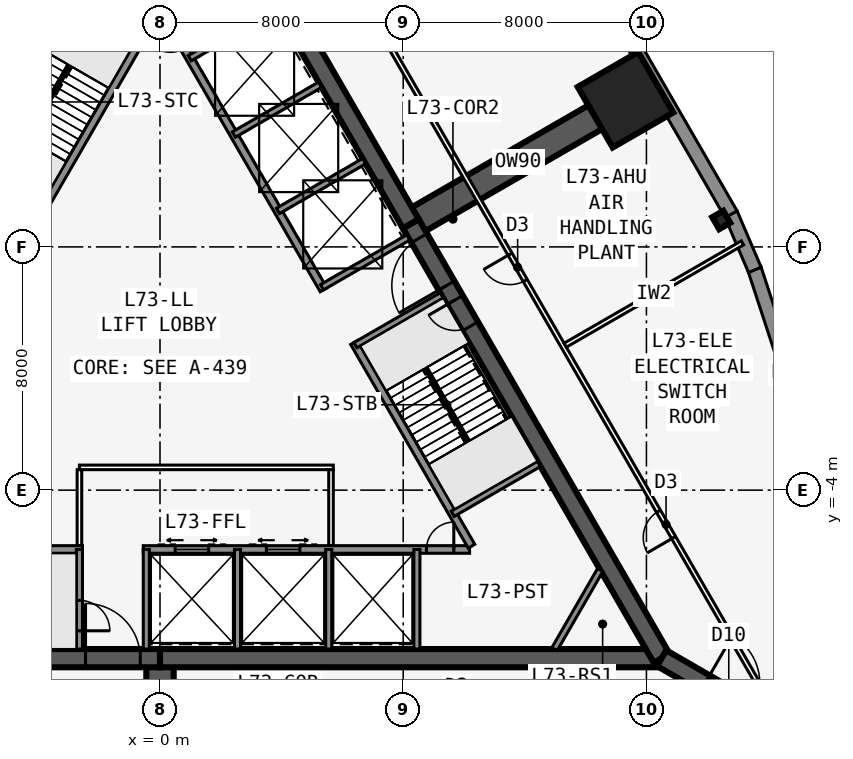
"""IFC4 building model, lengths in metres.
Left out: names, types, materials, properties, quantities, classifications, styles, units other than length and angle.
Written with IfcOpenShell. Run it as: python <this file> out.ifc"""

import sys

from ifc_helpers import new_model, si_unit, direction, frame, frame_2d, origin, origin_2d, place, context, subcontext, project, spatial, polyline, rectangle, i_section, outline, extrude, element, fill, save


model = new_model("IFC4")
c1 = context("Model", 3, precision=1e-05, world=origin(), true_north=direction((0.0, 1.0)))
c2 = subcontext(c1, "Body", "Model", "MODEL_VIEW")
j1 = project(units=[si_unit("LENGTHUNIT", "METRE"), si_unit("PLANEANGLEUNIT", "RADIAN")], contexts=[c1])
p1 = place(None, origin())
s1 = spatial("IfcSite", under=j1, at=p1, CompositionType="ELEMENT")
p2 = place(p1, origin())
s2 = spatial("IfcBuilding", under=s1, at=p2, CompositionType="ELEMENT")
p3 = place(p2, frame((0.0, 0.0, 275.3)))
s3 = spatial("IfcBuildingStorey", under=s2, at=p3, CompositionType="ELEMENT", Elevation=275.3)
p4 = place(p3, frame((-16.5, -9.526, 0.0), z_axis=(0.0, 0.0, 1.0), x_axis=(1.0, 0.0, 0.0)))
e1 = element("IfcWall", 1, at=p4, inside=s3, PredefinedType="SHEAR", context=c2, shape_type="SweptSolid", body=[
    extrude(rectangle(XDim=16.5, YDim=0.6, at=frame_2d((8.25, 0.0))), origin(), (0.0, 0.0, 1.0), 6.0),
])
p5 = place(p4, frame((14.05, 0.0, 0.0)))
e2 = element("IfcOpeningElement", 2, at=p5, cuts=e1, PredefinedType="OPENING", context=c2, shape_type="SweptSolid", body=[
    extrude(rectangle(XDim=1.8, YDim=2.13, at=frame_2d((0.9, 1.065))), frame((0.0, 0.31, 0.0), z_axis=(0.0, -1.0, 0.0), x_axis=(1.0, 0.0, 0.0)), (0.0, 0.0, 1.0), 0.62),
])
p6 = place(p3, frame((0.0, -9.526, 0.0), z_axis=(0.0, 0.0, 1.0), x_axis=(1.0, 0.0, 0.0)))
e3 = element("IfcWall", 3, at=p6, inside=s3, PredefinedType="SHEAR", context=c2, shape_type="SweptSolid", body=[
    extrude(rectangle(XDim=16.5, YDim=0.6, at=frame_2d((8.25, 0.0))), origin(), (0.0, 0.0, 1.0), 6.0),
])
p7 = place(p3, frame((-10.183, -5.951, 0.0), z_axis=(0.0, 0.0, 1.0), x_axis=(1.0, 0.0, 0.0)))
e4 = element("IfcWall", 4, at=p7, inside=s3, PredefinedType="SOLIDWALL", context=c2, shape_type="SweptSolid", body=[
    extrude(rectangle(XDim=7.633, YDim=0.25, at=frame_2d((3.816, 0.0))), origin(), (0.0, 0.0, 1.0), 5.75),
])
p8 = place(p3, frame((-0.55, -5.951, 0.0), z_axis=(0.0, 0.0, 1.0), x_axis=(1.0, 0.0, 0.0)))
e5 = element("IfcWall", 5, at=p8, inside=s3, PredefinedType="SOLIDWALL", context=c2, shape_type="SweptSolid", body=[
    extrude(rectangle(XDim=10.733, YDim=0.25, at=frame_2d((5.366, 0.0))), origin(), (0.0, 0.0, 1.0), 5.75),
])
p9 = place(p8, frame((9.314, 0.0, 0.0)))
e6 = element("IfcOpeningElement", 6, at=p9, cuts=e5, PredefinedType="OPENING", context=c2, shape_type="SweptSolid", body=[
    extrude(rectangle(XDim=0.9, YDim=2.13, at=frame_2d((0.45, 1.065))), frame((0.0, 0.135, 0.0), z_axis=(0.0, -1.0, 0.0), x_axis=(1.0, 0.0, 0.0)), (0.0, 0.0, 1.0), 0.27),
])
p10 = place(p8, frame((1.05, 0.0, 0.0)))
e7 = element("IfcOpeningElement", 7, at=p10, cuts=e5, PredefinedType="OPENING", context=c2, shape_type="SweptSolid", body=[
    extrude(rectangle(XDim=1.1, YDim=2.13, at=frame_2d((0.55, 1.065))), frame((0.0, 0.135, 0.0), z_axis=(0.0, -1.0, 0.0), x_axis=(1.0, 0.0, 0.0)), (0.0, 0.0, 1.0), 0.27),
])
p11 = place(p8, frame((4.05, 0.0, 0.0)))
e8 = element("IfcOpeningElement", 8, at=p11, cuts=e5, PredefinedType="OPENING", context=c2, shape_type="SweptSolid", body=[
    extrude(rectangle(XDim=1.1, YDim=2.13, at=frame_2d((0.55, 1.065))), frame((0.0, 0.135, 0.0), z_axis=(0.0, -1.0, 0.0), x_axis=(1.0, 0.0, 0.0)), (0.0, 0.0, 1.0), 0.27),
])
p12 = place(p3, frame((-2.65, -5.951, 0.0), z_axis=(0.0, 0.0, 1.0), x_axis=(0.0, -1.0, 0.0)))
e9 = element("IfcWall", 9, at=p12, inside=s3, PredefinedType="SOLIDWALL", context=c2, shape_type="SweptSolid", body=[
    extrude(rectangle(XDim=3.275, YDim=0.2, at=frame_2d((1.637, 0.0))), origin(), (0.0, 0.0, 1.0), 5.75),
])
p13 = place(p12, frame((1.675, 0.0, 0.0)))
e10 = element("IfcOpeningElement", 10, at=p13, cuts=e9, PredefinedType="OPENING", context=c2, shape_type="SweptSolid", body=[
    extrude(rectangle(XDim=1.0, YDim=2.13, at=frame_2d((0.5, 1.065))), frame((0.0, 0.11, 0.0), z_axis=(0.0, -1.0, 0.0), x_axis=(1.0, 0.0, 0.0)), (0.0, 0.0, 1.0), 0.22),
])
for number, where, z_axis, x_axis in (
    (11, (-0.45, -5.951, 0.0), (0.0, 0.0, 1.0), (0.0, -1.0, 0.0)),
    (12, (2.55, -5.951, 0.0), (0.0, 0.0, 1.0), (0.0, -1.0, 0.0)),
    (13, (5.55, -5.951, 0.0), (0.0, 0.0, 1.0), (0.0, -1.0, 0.0)),
    (14, (8.45, -5.951, 0.0), (0.0, 0.0, 1.0), (0.0, -1.0, 0.0)),
):
    element("IfcWall", number, at=place(p3, frame(where, z_axis=z_axis, x_axis=x_axis)), inside=s3, PredefinedType="SOLIDWALL", context=c2, shape_type="SweptSolid", body=[
        extrude(rectangle(XDim=3.275, YDim=0.2, at=frame_2d((1.637, 0.0))), origin(), (0.0, 0.0, 1.0), 5.75),
    ])
p14 = place(p3, frame((16.5, -9.526, 0.0), z_axis=(0.0, 0.0, 1.0), x_axis=(-0.499996545922, 0.866027397988, 0.0)))
e15 = element("IfcWall", 15, at=p14, inside=s3, PredefinedType="SHEAR", context=c2, shape_type="SweptSolid", body=[
    extrude(rectangle(XDim=16.5, YDim=0.6, at=frame_2d((8.25, 0.0))), origin(), (0.0, 0.0, 1.0), 6.0),
])
p15 = place(p14, frame((14.15, 0.0, 0.0)))
e16 = element("IfcOpeningElement", 16, at=p15, cuts=e15, PredefinedType="OPENING", context=c2, shape_type="SweptSolid", body=[
    extrude(rectangle(XDim=1.8, YDim=2.13, at=frame_2d((0.9, 1.065))), frame((0.0, 0.31, 0.0), z_axis=(0.0, -1.0, 0.0), x_axis=(1.0, 0.0, 0.0)), (0.0, 0.0, 1.0), 0.62),
])
p16 = place(p14, frame((12.6, 0.0, 0.0)))
e17 = element("IfcOpeningElement", 17, at=p16, cuts=e15, PredefinedType="OPENING", context=c2, shape_type="SweptSolid", body=[
    extrude(rectangle(XDim=1.0, YDim=2.13, at=frame_2d((0.5, 1.065))), frame((0.0, 0.31, 0.0), z_axis=(0.0, -1.0, 0.0), x_axis=(1.0, 0.0, 0.0)), (0.0, 0.0, 1.0), 0.62),
])
p17 = place(p3, frame((8.25, 4.763, 0.0), z_axis=(0.0, 0.0, 1.0), x_axis=(-0.500002952946, 0.866023698893, 0.0)))
e18 = element("IfcWall", 18, at=p17, inside=s3, PredefinedType="SHEAR", context=c2, shape_type="SweptSolid", body=[
    extrude(rectangle(XDim=16.5, YDim=0.6, at=frame_2d((8.25, 0.0))), origin(), (0.0, 0.0, 1.0), 6.0),
])
p18 = place(p3, frame((10.245, -5.843, 0.0), z_axis=(0.0, 0.0, 1.0), x_axis=(-0.499993009313, 0.866029439822, 0.0)))
e19 = element("IfcWall", 19, at=p18, inside=s3, PredefinedType="SOLIDWALL", context=c2, shape_type="SweptSolid", body=[
    extrude(rectangle(XDim=7.733, YDim=0.25, at=frame_2d((3.866, 0.0))), origin(), (0.0, 0.0, 1.0), 5.75),
])
p19 = place(p3, frame((5.379, 2.586, 0.0), z_axis=(0.0, 0.0, 1.0), x_axis=(-0.500001375892, 0.866024609411, 0.0)))
e20 = element("IfcWall", 20, at=p19, inside=s3, PredefinedType="SOLIDWALL", context=c2, shape_type="SweptSolid", body=[
    extrude(rectangle(XDim=10.633, YDim=0.25, at=frame_2d((5.316, 0.0))), origin(), (0.0, 0.0, 1.0), 5.75),
])
p20 = place(p19, frame((9.164, 0.0, 0.0)))
e21 = element("IfcOpeningElement", 21, at=p20, cuts=e20, PredefinedType="OPENING", context=c2, shape_type="SweptSolid", body=[
    extrude(rectangle(XDim=0.9, YDim=2.13, at=frame_2d((0.45, 1.065))), frame((0.0, 0.135, 0.0), z_axis=(0.0, -1.0, 0.0), x_axis=(1.0, 0.0, 0.0)), (0.0, 0.0, 1.0), 0.27),
])
p21 = place(p3, frame((9.629, -4.775, 0.0), z_axis=(0.0, 0.0, 1.0), x_axis=(0.865995643347, 0.500051543047, 0.0)))
e22 = element("IfcWall", 22, at=p21, inside=s3, PredefinedType="SOLIDWALL", context=c2, shape_type="SweptSolid", body=[
    extrude(rectangle(XDim=3.275, YDim=0.2, at=frame_2d((1.638, 0.0))), origin(), (0.0, 0.0, 1.0), 5.75),
])
for number, where, z_axis, x_axis in (
    (23, (6.429, 0.767, 0.0), (0.0, 0.0, 1.0), (0.866, 0.5, 0.0)),
    (24, (5.329, 2.673, 0.0), (0.0, 0.0, 1.0), (0.866, 0.5, 0.0)),
    (25, (3.879, 5.184, 0.0), (0.0, 0.0, 1.0), (0.866, 0.5, 0.0)),
    (26, (2.429, 7.696, 0.0), (0.0, 0.0, 1.0), (0.866, 0.5, 0.0)),
    (27, (0.979, 10.207, 0.0), (0.0, 0.0, 1.0), (0.866, 0.5, 0.0)),
):
    element("IfcWall", number, at=place(p3, frame(where, z_axis=z_axis, x_axis=x_axis)), inside=s3, PredefinedType="SOLIDWALL", context=c2, shape_type="SweptSolid", body=[
        extrude(rectangle(XDim=3.275, YDim=0.2, at=frame_2d((1.637, 0.0))), origin(), (0.0, 0.0, 1.0), 5.75),
    ])
p22 = place(p3, frame((0.0, 19.052, 0.0), z_axis=(0.0, 0.0, 1.0), x_axis=(-0.500002952946, -0.866023698893, 0.0)))
e28 = element("IfcWall", 28, at=p22, inside=s3, PredefinedType="SHEAR", context=c2, shape_type="SweptSolid", body=[
    extrude(rectangle(XDim=16.5, YDim=0.6, at=frame_2d((8.25, 0.0))), origin(), (0.0, 0.0, 1.0), 6.0),
])
p23 = place(p22, frame((14.15, 0.0, 0.0)))
e29 = element("IfcOpeningElement", 29, at=p23, cuts=e28, PredefinedType="OPENING", context=c2, shape_type="SweptSolid", body=[
    extrude(rectangle(XDim=1.8, YDim=2.13, at=frame_2d((0.9, 1.065))), frame((0.0, 0.31, 0.0), z_axis=(0.0, -1.0, 0.0), x_axis=(1.0, 0.0, 0.0)), (0.0, 0.0, 1.0), 0.62),
])
p24 = place(p22, frame((12.6, 0.0, 0.0)))
e30 = element("IfcOpeningElement", 30, at=p24, cuts=e28, PredefinedType="OPENING", context=c2, shape_type="SweptSolid", body=[
    extrude(rectangle(XDim=1.0, YDim=2.13, at=frame_2d((0.5, 1.065))), frame((0.0, 0.31, 0.0), z_axis=(0.0, -1.0, 0.0), x_axis=(1.0, 0.0, 0.0)), (0.0, 0.0, 1.0), 0.62),
])
p25 = place(p3, frame((-0.062, 11.794, 0.0), z_axis=(0.0, 0.0, 1.0), x_axis=(-0.500006680225, -0.86602154692, 0.0)))
e31 = element("IfcWall", 31, at=p25, inside=s3, PredefinedType="SOLIDWALL", context=c2, shape_type="SweptSolid", body=[
    extrude(rectangle(XDim=7.733, YDim=0.25, at=frame_2d((3.866, 0.0))), origin(), (0.0, 0.0, 1.0), 5.75),
])
p26 = place(p3, frame((16.5, -9.526, 0.0), z_axis=(0.0, 0.0, 1.0), x_axis=(0.866031398331, -0.499989616998, 0.0)))
e32 = element("IfcWall", 32, at=p26, inside=s3, PredefinedType="SHEAR", context=c2, shape_type="SweptSolid", body=[
    extrude(rectangle(XDim=4.746, YDim=0.6, at=frame_2d((2.373, 0.0))), origin(), (0.0, 0.0, 1.0), 6.0),
])
p27 = place(p26, frame((1.65, 0.0, 0.0)))
e33 = element("IfcOpeningElement", 33, at=p27, cuts=e32, PredefinedType="OPENING", context=c2, shape_type="SweptSolid", body=[
    extrude(rectangle(XDim=1.8, YDim=2.13, at=frame_2d((0.9, 1.065))), frame((0.0, 0.31, 0.0), z_axis=(0.0, -1.0, 0.0), x_axis=(1.0, 0.0, 0.0)), (0.0, 0.0, 1.0), 0.62),
])
p28 = place(p3, frame((0.0, -9.526, 0.0), z_axis=(0.0, 0.0, 1.0), x_axis=(0.0, -1.0, 0.0)))
e34 = element("IfcWall", 34, at=p28, inside=s3, PredefinedType="SHEAR", context=c2, shape_type="SweptSolid", body=[
    extrude(rectangle(XDim=8.154, YDim=0.9, at=frame_2d((4.077, 0.0))), origin(), (0.0, 0.0, 1.0), 6.0),
])
p29 = place(p3, frame((8.25, 4.763, 0.0), z_axis=(0.0, 0.0, 1.0), x_axis=(0.866023543838, 0.500003221507, 0.0)))
e35 = element("IfcWall", 35, at=p29, inside=s3, PredefinedType="SHEAR", context=c2, shape_type="SweptSolid", body=[
    extrude(rectangle(XDim=8.154, YDim=0.9, at=frame_2d((4.077, 0.0))), origin(), (0.0, 0.0, 1.0), 6.0),
])
p30 = place(p3, frame((18.461, 4.885, 0.0), z_axis=(0.0, 0.0, 1.0), x_axis=(0.866025403784, 0.5, 0.0)))
e36 = element("IfcColumn", 36, at=p30, inside=s3, PredefinedType="COLUMN", context=c2, shape_type="SweptSolid", body=[
    extrude(i_section(OverallWidth=0.419, OverallDepth=0.455, WebThickness=0.042, FlangeThickness=0.068, at=origin_2d()), origin(), (0.0, 0.0, 1.0), 6.0),
])
p31 = place(p3, frame((15.312, 8.84, 0.0), z_axis=(0.0, 0.0, 1.0), x_axis=(0.866025403784, 0.5, 0.0)))
e37 = element("IfcColumn", 37, at=p31, inside=s3, PredefinedType="COLUMN", context=c2, shape_type="SweptSolid", body=[
    extrude(rectangle(XDim=2.3, YDim=2.3, at=origin_2d()), origin(), (0.0, 0.0, 1.0), 6.0),
])
p32 = place(p3, frame((21.786, -3.534, 0.0), z_axis=(0.0, 0.0, 1.0), x_axis=(-0.311328857048, 0.95030223759, 0.0)))
e38 = element("IfcWall", 38, at=p32, inside=s3, PredefinedType="SOLIDWALL", context=c2, shape_type="SweptSolid", body=[
    extrude(outline(polyline([(0.0, 0.0), (7.153, 0.0), (7.153, 5.75), (0.0, 5.75), (0.0, 0.0)]), holes=[polyline([(5.826, 2.875), (5.75, 3.457), (5.525, 4.0), (5.167, 4.466), (4.701, 4.823), (4.159, 5.048), (3.576, 5.125), (2.994, 5.048), (2.451, 4.823), (1.985, 4.466), (1.628, 4.0), (1.403, 3.457), (1.326, 2.875), (1.403, 2.293), (1.628, 1.75), (1.985, 1.284), (2.451, 0.926), (2.994, 0.702), (3.576, 0.625), (4.159, 0.702), (4.701, 0.926), (5.167, 1.284), (5.525, 1.75), (5.75, 2.293), (5.826, 2.875)])]), frame((0.0, 0.225, 0.0), z_axis=(0.0, -1.0, 0.0), x_axis=(1.0, 0.0, 0.0)), (0.0, 0.0, 1.0), 0.45),
])
p33 = place(p3, frame((19.566, 3.245, 0.0), z_axis=(0.0, 0.0, 1.0), x_axis=(-0.393290226175, 0.91941437774, 0.0)))
e39 = element("IfcWall", 39, at=p33, inside=s3, PredefinedType="SOLIDWALL", context=c2, shape_type="SweptSolid", body=[
    extrude(rectangle(XDim=2.014, YDim=0.45, at=frame_2d((1.007, 0.0))), origin(), (0.0, 0.0, 1.0), 5.75),
])
p34 = place(p3, frame((18.786, 5.073, 0.0), z_axis=(0.0, 0.0, 1.0), x_axis=(-0.499993662806, 0.866029062534, 0.0)))
e40 = element("IfcWall", 40, at=p34, inside=s3, PredefinedType="SOLIDWALL", context=c2, shape_type="SweptSolid", body=[
    extrude(outline(polyline([(0.0, 0.0), (10.0, 0.0), (10.0, 5.75), (0.0, 5.75), (0.0, 0.0)]), holes=[polyline([(7.25, 2.875), (7.173, 3.457), (6.948, 4.0), (6.591, 4.466), (6.125, 4.823), (5.583, 5.048), (5.0, 5.125), (4.418, 5.048), (3.875, 4.823), (3.409, 4.466), (3.052, 4.0), (2.827, 3.457), (2.75, 2.875), (2.827, 2.293), (3.052, 1.75), (3.409, 1.284), (3.875, 0.926), (4.418, 0.702), (5.0, 0.625), (5.583, 0.702), (6.125, 0.926), (6.591, 1.284), (6.948, 1.75), (7.173, 2.293), (7.25, 2.875)])]), frame((0.0, 0.225, 0.0), z_axis=(0.0, -1.0, 0.0), x_axis=(1.0, 0.0, 0.0)), (0.0, 0.0, 1.0), 0.45),
])
p35 = place(p3, frame((20.177, -11.245, 0.0), z_axis=(0.0, 0.0, 1.0), x_axis=(-0.499998875317, 0.866026053119, 0.0)))
e41 = element("IfcWall", 41, at=p35, inside=s3, PredefinedType="PARTITIONING", context=c2, shape_type="SweptSolid", body=[
    extrude(rectangle(XDim=39.654, YDim=0.15, at=frame_2d((19.827, 0.0))), origin(), (0.0, 0.0, 1.0), 5.75),
])
p36 = place(p35, frame((6.563, 0.0, 0.0)))
e42 = element("IfcOpeningElement", 42, at=p36, cuts=e41, PredefinedType="OPENING", context=c2, shape_type="SweptSolid", body=[
    extrude(rectangle(XDim=1.0, YDim=2.13, at=frame_2d((0.5, 1.065))), frame((0.0, 0.085, 0.0), z_axis=(0.0, -1.0, 0.0), x_axis=(1.0, 0.0, 0.0)), (0.0, 0.0, 1.0), 0.17),
])
p37 = place(p35, frame((16.327, 0.0, 0.0)))
e43 = element("IfcOpeningElement", 43, at=p37, cuts=e41, PredefinedType="OPENING", context=c2, shape_type="SweptSolid", body=[
    extrude(rectangle(XDim=1.0, YDim=2.13, at=frame_2d((0.5, 1.065))), frame((0.0, 0.085, 0.0), z_axis=(0.0, -1.0, 0.0), x_axis=(1.0, 0.0, 0.0)), (0.0, 0.0, 1.0), 0.17),
])
p38 = place(p35, frame((29.091, 0.0, 0.0)))
e44 = element("IfcOpeningElement", 44, at=p38, cuts=e41, PredefinedType="OPENING", context=c2, shape_type="SweptSolid", body=[
    extrude(rectangle(XDim=1.0, YDim=2.13, at=frame_2d((0.5, 1.065))), frame((0.0, 0.085, 0.0), z_axis=(0.0, -1.0, 0.0), x_axis=(1.0, 0.0, 0.0)), (0.0, 0.0, 1.0), 0.17),
])
p39 = place(p3, frame((13.329, 0.767, 0.0), z_axis=(0.0, 0.0, 1.0), x_axis=(0.866020720842, 0.500008111007, 0.0)))
e45 = element("IfcWall", 45, at=p39, inside=s3, PredefinedType="PARTITIONING", context=c2, shape_type="SweptSolid", body=[
    extrude(rectangle(XDim=6.732, YDim=0.15, at=frame_2d((3.366, 0.0))), origin(), (0.0, 0.0, 1.0), 5.75),
])
p40 = place(p3, frame((-0.35, 23.096, 0.0), z_axis=(0.0, 0.0, 1.0), x_axis=(-0.499998875317, -0.866026053119, 0.0)))
e46 = element("IfcWall", 46, at=p40, inside=s3, PredefinedType="PARTITIONING", context=c2, shape_type="SweptSolid", body=[
    extrude(rectangle(XDim=39.654, YDim=0.15, at=frame_2d((19.827, 0.0))), origin(), (0.0, 0.0, 1.0), 5.75),
])
p41 = place(p40, frame((9.563, 0.0, 0.0)))
e47 = element("IfcOpeningElement", 47, at=p41, cuts=e46, PredefinedType="OPENING", context=c2, shape_type="SweptSolid", body=[
    extrude(rectangle(XDim=1.0, YDim=2.13, at=frame_2d((0.5, 1.065))), frame((0.0, 0.085, 0.0), z_axis=(0.0, -1.0, 0.0), x_axis=(1.0, 0.0, 0.0)), (0.0, 0.0, 1.0), 0.17),
])
p42 = place(p40, frame((22.327, 0.0, 0.0)))
e48 = element("IfcOpeningElement", 48, at=p42, cuts=e46, PredefinedType="OPENING", context=c2, shape_type="SweptSolid", body=[
    extrude(rectangle(XDim=1.0, YDim=2.13, at=frame_2d((0.5, 1.065))), frame((0.0, 0.085, 0.0), z_axis=(0.0, -1.0, 0.0), x_axis=(1.0, 0.0, 0.0)), (0.0, 0.0, 1.0), 0.17),
])
p43 = place(p40, frame((32.091, 0.0, 0.0)))
e49 = element("IfcOpeningElement", 49, at=p43, cuts=e46, PredefinedType="OPENING", context=c2, shape_type="SweptSolid", body=[
    extrude(rectangle(XDim=1.0, YDim=2.13, at=frame_2d((0.5, 1.065))), frame((0.0, 0.085, 0.0), z_axis=(0.0, -1.0, 0.0), x_axis=(1.0, 0.0, 0.0)), (0.0, 0.0, 1.0), 0.17),
])
p44 = place(p3, frame((-2.65, -3.251, 0.0), z_axis=(0.0, 0.0, 1.0), x_axis=(1.0, 0.0, 0.0)))
e50 = element("IfcWall", 50, at=p44, inside=s3, PredefinedType="PARTITIONING", context=c2, shape_type="SweptSolid", body=[
    extrude(rectangle(XDim=8.35, YDim=0.15, at=frame_2d((4.175, 0.0))), origin(), (0.0, 0.0, 1.0), 5.75),
])
for number, where, z_axis, x_axis in (
    (51, (-2.65, -5.826, 0.0), (0.0, 0.0, 1.0), (0.0, 1.0, 0.0)),
    (52, (5.625, -5.826, 0.0), (0.0, 0.0, 1.0), (0.0, 1.0, 0.0)),
):
    element("IfcWall", number, at=place(p3, frame(where, z_axis=z_axis, x_axis=x_axis)), inside=s3, PredefinedType="PARTITIONING", context=c2, shape_type="SweptSolid", body=[
        extrude(rectangle(XDim=2.5, YDim=0.15, at=frame_2d((1.25, 0.0))), origin(), (0.0, 0.0, 1.0), 5.75),
    ])
p45 = place(p3, frame((14.479, -6.626, 0.0), z_axis=(0.0, 0.0, 1.0), x_axis=(-0.499952404951, -0.866052881055, 0.0)))
e53 = element("IfcWall", 53, at=p45, inside=s3, PredefinedType="SOLIDWALL", context=c2, shape_type="SweptSolid", body=[
    extrude(rectangle(XDim=3.002, YDim=0.2, at=frame_2d((1.501, 0.0))), origin(), (0.0, 0.0, 1.0), 5.75),
])
for number, where, z_axis, x_axis in (
    (54, (10.135, -2.401, 0.0), (0.0, 0.0, 1.0), (-0.5, 0.866, 0.0)),
    (55, (-2.988, 9.978, 0.0), (0.0, 0.0, 1.0), (-0.5, -0.866, 0.0)),
):
    element("IfcWall", number, at=place(p3, frame(where, z_axis=z_axis, x_axis=x_axis)), inside=s3, PredefinedType="SOLIDWALL", context=c2, shape_type="SweptSolid", body=[
        extrude(rectangle(XDim=2.794, YDim=0.1, at=frame_2d((1.397, 0.0))), origin(), (0.0, 0.0, 1.0), 6.0),
    ])
p46 = place(p36, origin())
e56 = element("IfcDoor", 56, at=p46, inside=s3, OperationType="SINGLE_SWING_LEFT", PredefinedType="DOOR", context=c2, shape_type="SweptSolid", body=[
    extrude(rectangle(XDim=1.0, YDim=2.13, at=frame_2d((0.5, 1.065))), frame((0.0, 0.025, 0.0), z_axis=(0.0, -1.0, 0.0), x_axis=(1.0, 0.0, 0.0)), (0.0, 0.0, 1.0), 0.05),
])
fill(e42, e56)
p47 = place(p37, origin())
e57 = element("IfcDoor", 57, at=p47, inside=s3, OperationType="SINGLE_SWING_RIGHT", PredefinedType="DOOR", context=c2, shape_type="SweptSolid", body=[
    extrude(rectangle(XDim=1.0, YDim=2.13, at=frame_2d((0.5, 1.065))), frame((0.0, 0.025, 0.0), z_axis=(0.0, -1.0, 0.0), x_axis=(1.0, 0.0, 0.0)), (0.0, 0.0, 1.0), 0.05),
])
fill(e43, e57)
p48 = place(p5, origin())
e58 = element("IfcDoor", 58, at=p48, inside=s3, OperationType="DOUBLE_DOOR_SINGLE_SWING", PredefinedType="DOOR", context=c2, shape_type="SweptSolid", body=[
    extrude(rectangle(XDim=1.8, YDim=2.13, at=frame_2d((0.9, 1.065))), frame((0.0, 0.025, 0.0), z_axis=(0.0, -1.0, 0.0), x_axis=(1.0, 0.0, 0.0)), (0.0, 0.0, 1.0), 0.05),
])
fill(e2, e58)
p49 = place(p13, origin())
e59 = element("IfcDoor", 59, at=p49, inside=s3, OperationType="SINGLE_SWING_RIGHT", PredefinedType="DOOR", context=c2, shape_type="SweptSolid", body=[
    extrude(rectangle(XDim=1.0, YDim=2.13, at=frame_2d((0.5, 1.065))), frame((0.0, 0.025, 0.0), z_axis=(0.0, -1.0, 0.0), x_axis=(1.0, 0.0, 0.0)), (0.0, 0.0, 1.0), 0.05),
])
fill(e10, e59)
p50 = place(p15, origin())
e60 = element("IfcDoor", 60, at=p50, inside=s3, OperationType="DOUBLE_DOOR_SINGLE_SWING", PredefinedType="DOOR", context=c2, shape_type="SweptSolid", body=[
    extrude(rectangle(XDim=1.8, YDim=2.13, at=frame_2d((0.9, 1.065))), frame((0.0, 0.025, 0.0), z_axis=(0.0, -1.0, 0.0), x_axis=(1.0, 0.0, 0.0)), (0.0, 0.0, 1.0), 0.05),
])
fill(e16, e60)
p51 = place(p16, origin())
e61 = element("IfcDoor", 61, at=p51, inside=s3, OperationType="SINGLE_SWING_RIGHT", PredefinedType="DOOR", context=c2, shape_type="SweptSolid", body=[
    extrude(rectangle(XDim=1.0, YDim=2.13, at=frame_2d((0.5, 1.065))), frame((0.0, 0.025, 0.0), z_axis=(0.0, -1.0, 0.0), x_axis=(1.0, 0.0, 0.0)), (0.0, 0.0, 1.0), 0.05),
])
fill(e17, e61)
p52 = place(p9, origin())
e62 = element("IfcDoor", 62, at=p52, inside=s3, OperationType="SINGLE_SWING_RIGHT", PredefinedType="DOOR", context=c2, shape_type="SweptSolid", body=[
    extrude(rectangle(XDim=0.9, YDim=2.13, at=frame_2d((0.45, 1.065))), frame((0.0, 0.025, 0.0), z_axis=(0.0, -1.0, 0.0), x_axis=(1.0, 0.0, 0.0)), (0.0, 0.0, 1.0), 0.05),
])
fill(e6, e62)
p53 = place(p10, origin())
e63 = element("IfcDoor", 63, at=p53, inside=s3, OperationType="DOUBLE_DOOR_SLIDING", PredefinedType="USERDEFINED", context=c2, shape_type="SweptSolid", body=[
    extrude(rectangle(XDim=1.1, YDim=2.13, at=frame_2d((0.55, 1.065))), frame((0.0, 0.025, 0.0), z_axis=(0.0, -1.0, 0.0), x_axis=(1.0, 0.0, 0.0)), (0.0, 0.0, 1.0), 0.05),
])
fill(e7, e63)
p54 = place(p11, origin())
e64 = element("IfcDoor", 64, at=p54, inside=s3, OperationType="DOUBLE_DOOR_SLIDING", PredefinedType="USERDEFINED", context=c2, shape_type="SweptSolid", body=[
    extrude(rectangle(XDim=1.1, YDim=2.13, at=frame_2d((0.55, 1.065))), frame((0.0, 0.025, 0.0), z_axis=(0.0, -1.0, 0.0), x_axis=(1.0, 0.0, 0.0)), (0.0, 0.0, 1.0), 0.05),
])
fill(e8, e64)
save(model, sys.argv[1])
